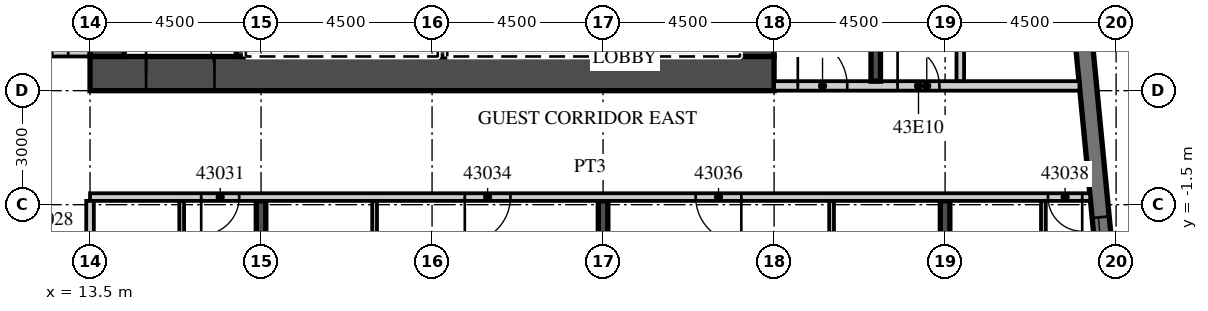
"""IFC4 building model, lengths in metres.
Left out: names, types, materials, properties, quantities, classifications, styles, units other than length and angle.
Written with IfcOpenShell. Run it as: python <this file> out.ifc"""

import sys

from ifc_helpers import new_model, si_unit, direction, frame, frame_2d, origin, place, context, subcontext, project, spatial, rectangle, extrude, element, fill, save


model = new_model("IFC4")
c1 = context("Model", 3, precision=1e-05, world=origin(), true_north=direction((0.0, 1.0)))
c2 = subcontext(c1, "Body", "Model", "MODEL_VIEW")
j1 = project(units=[si_unit("LENGTHUNIT", "METRE"), si_unit("PLANEANGLEUNIT", "RADIAN")], contexts=[c1])
p1 = place(None, origin())
s1 = spatial("IfcSite", under=j1, at=p1, CompositionType="ELEMENT")
p2 = place(p1, origin())
s2 = spatial("IfcBuilding", under=s1, at=p2, CompositionType="ELEMENT")
p3 = place(p2, frame((0.0, 0.0, 183.4)))
s3 = spatial("IfcBuildingStorey", under=s2, at=p3, CompositionType="ELEMENT", Elevation=183.4)
p4 = place(p3, frame((18.0, -19.245, 0.0), z_axis=(0.0, 0.0, 1.0), x_axis=(0.0, 1.0, 0.0)))
e1 = element("IfcWall", 1, at=p4, inside=s3, PredefinedType="SHEAR", context=c2, shape_type="SweptSolid", body=[
    extrude(rectangle(XDim=17.845, YDim=0.25, at=frame_2d((8.923, 0.0))), origin(), (0.0, 0.0, 1.0), 3.3),
])
p5 = place(p3, frame((27.0, -18.379, 0.0), z_axis=(0.0, 0.0, 1.0), x_axis=(0.0, 1.0, 0.0)))
e2 = element("IfcWall", 2, at=p5, inside=s3, PredefinedType="SHEAR", context=c2, shape_type="SweptSolid", body=[
    extrude(rectangle(XDim=16.979, YDim=0.25, at=frame_2d((8.489, 0.0))), origin(), (0.0, 0.0, 1.0), 3.3),
])
p6 = place(p3, frame((36.0, -17.512, 0.0), z_axis=(0.0, 0.0, 1.0), x_axis=(0.0, 1.0, 0.0)))
e3 = element("IfcWall", 3, at=p6, inside=s3, PredefinedType="SHEAR", context=c2, shape_type="SweptSolid", body=[
    extrude(rectangle(XDim=16.112, YDim=0.25, at=frame_2d((8.056, 0.0))), origin(), (0.0, 0.0, 1.0), 3.3),
])
p7 = place(p3, frame((41.214, -13.466, 0.0), z_axis=(0.0, 0.0, 1.0), x_axis=(-0.095847314626, 0.995396047952, 0.0)))
e4 = element("IfcWall", 4, at=p7, inside=s3, PredefinedType="SOLIDWALL", context=c2, shape_type="SweptSolid", body=[
    extrude(rectangle(XDim=34.0, YDim=0.45, at=frame_2d((17.0, 0.0))), origin(), (0.0, 0.0, 1.0), 3.02),
])
p8 = place(p7, frame((3.869, 0.0, 0.45)))
e5 = element("IfcOpeningElement", 5, at=p8, cuts=e4, PredefinedType="OPENING", context=c2, shape_type="SweptSolid", body=[
    extrude(rectangle(XDim=3.3, YDim=2.25, at=frame_2d((1.65, 1.125))), frame((0.0, 0.235, 0.0), z_axis=(0.0, -1.0, 0.0), x_axis=(1.0, 0.0, 0.0)), (0.0, 0.0, 1.0), 0.47),
])
p9 = place(p7, frame((8.39, 0.0, 0.45)))
e6 = element("IfcOpeningElement", 6, at=p9, cuts=e4, PredefinedType="OPENING", context=c2, shape_type="SweptSolid", body=[
    extrude(rectangle(XDim=3.3, YDim=2.25, at=frame_2d((1.65, 1.125))), frame((0.0, 0.235, 0.0), z_axis=(0.0, -1.0, 0.0), x_axis=(1.0, 0.0, 0.0)), (0.0, 0.0, 1.0), 0.47),
])
p10 = place(p3, frame((-13.5, 2.5, 0.0), z_axis=(0.0, 0.0, 1.0), x_axis=(1.0, 0.0, 0.0)))
e7 = element("IfcWall", 7, at=p10, inside=s3, PredefinedType="PARTITIONING", context=c2, shape_type="SweptSolid", body=[
    extrude(rectangle(XDim=27.0, YDim=0.2, at=frame_2d((13.5, 0.0))), origin(), (0.0, 0.0, 1.0), 3.02),
])
p11 = place(p10, frame((0.575, 0.0, 0.0)))
e8 = element("IfcOpeningElement", 8, at=p11, cuts=e7, PredefinedType="OPENING", context=c2, shape_type="SweptSolid", body=[
    extrude(rectangle(XDim=1.0, YDim=2.1, at=frame_2d((0.5, 1.05))), frame((0.0, 0.11, 0.0), z_axis=(0.0, -1.0, 0.0), x_axis=(1.0, 0.0, 0.0)), (0.0, 0.0, 1.0), 0.22),
])
p12 = place(p10, frame((9.863, 0.0, 0.0)))
e9 = element("IfcOpeningElement", 9, at=p12, cuts=e7, PredefinedType="OPENING", context=c2, shape_type="SweptSolid", body=[
    extrude(rectangle(XDim=1.2, YDim=2.1, at=frame_2d((0.6, 1.05))), frame((0.0, 0.11, 0.0), z_axis=(0.0, -1.0, 0.0), x_axis=(1.0, 0.0, 0.0)), (0.0, 0.0, 1.0), 0.22),
])
p13 = place(p10, frame((15.938, 0.0, 0.0)))
e10 = element("IfcOpeningElement", 10, at=p13, cuts=e7, PredefinedType="OPENING", context=c2, shape_type="SweptSolid", body=[
    extrude(rectangle(XDim=1.2, YDim=2.1, at=frame_2d((0.6, 1.05))), frame((0.0, 0.11, 0.0), z_axis=(0.0, -1.0, 0.0), x_axis=(1.0, 0.0, 0.0)), (0.0, 0.0, 1.0), 0.22),
])
p14 = place(p10, frame((25.425, 0.0, 0.0)))
e11 = element("IfcOpeningElement", 11, at=p14, cuts=e7, PredefinedType="OPENING", context=c2, shape_type="SweptSolid", body=[
    extrude(rectangle(XDim=1.0, YDim=2.1, at=frame_2d((0.5, 1.05))), frame((0.0, 0.11, 0.0), z_axis=(0.0, -1.0, 0.0), x_axis=(1.0, 0.0, 0.0)), (0.0, 0.0, 1.0), 0.22),
])
p15 = place(p3, frame((13.5, -1.3, 0.0), z_axis=(0.0, 0.0, 1.0), x_axis=(1.0, 0.0, 0.0)))
e12 = element("IfcWall", 12, at=p15, inside=s3, PredefinedType="PARTITIONING", context=c2, shape_type="SweptSolid", body=[
    extrude(rectangle(XDim=26.317, YDim=0.2, at=frame_2d((13.158, 0.0))), origin(), (0.0, 0.0, 1.0), 3.02),
])
p16 = place(p15, frame((2.925, 0.0, 0.0)))
e13 = element("IfcOpeningElement", 13, at=p16, cuts=e12, PredefinedType="OPENING", context=c2, shape_type="SweptSolid", body=[
    extrude(rectangle(XDim=1.0, YDim=2.1, at=frame_2d((0.5, 1.05))), frame((0.0, 0.11, 0.0), z_axis=(0.0, -1.0, 0.0), x_axis=(1.0, 0.0, 0.0)), (0.0, 0.0, 1.0), 0.22),
])
p17 = place(p15, frame((9.862, 0.0, 0.0)))
e14 = element("IfcOpeningElement", 14, at=p17, cuts=e12, PredefinedType="OPENING", context=c2, shape_type="SweptSolid", body=[
    extrude(rectangle(XDim=1.2, YDim=2.1, at=frame_2d((0.6, 1.05))), frame((0.0, 0.11, 0.0), z_axis=(0.0, -1.0, 0.0), x_axis=(1.0, 0.0, 0.0)), (0.0, 0.0, 1.0), 0.22),
])
p18 = place(p15, frame((15.938, 0.0, 0.0)))
e15 = element("IfcOpeningElement", 15, at=p18, cuts=e12, PredefinedType="OPENING", context=c2, shape_type="SweptSolid", body=[
    extrude(rectangle(XDim=1.2, YDim=2.1, at=frame_2d((0.6, 1.05))), frame((0.0, 0.11, 0.0), z_axis=(0.0, -1.0, 0.0), x_axis=(1.0, 0.0, 0.0)), (0.0, 0.0, 1.0), 0.22),
])
p19 = place(p15, frame((25.208, 0.0, 0.0)))
e16 = element("IfcOpeningElement", 16, at=p19, cuts=e12, PredefinedType="OPENING", context=c2, shape_type="SweptSolid", body=[
    extrude(rectangle(XDim=0.9, YDim=2.1, at=frame_2d((0.45, 1.05))), frame((0.0, 0.11, 0.0), z_axis=(0.0, -1.0, 0.0), x_axis=(1.0, 0.0, 0.0)), (0.0, 0.0, 1.0), 0.22),
])
p20 = place(p3, frame((13.5, -19.701, 0.0), z_axis=(0.0, 0.0, 1.0), x_axis=(0.0, 1.0, 0.0)))
e17 = element("IfcWall", 17, at=p20, inside=s3, PredefinedType="PARTITIONING", context=c2, shape_type="SweptSolid", body=[
    extrude(rectangle(XDim=18.301, YDim=0.2, at=frame_2d((9.15, 0.0))), origin(), (0.0, 0.0, 1.0), 3.02),
])
p21 = place(p3, frame((15.912, -6.625, 0.0), z_axis=(0.0, 0.0, 1.0), x_axis=(0.0, 1.0, 0.0)))
e18 = element("IfcWall", 18, at=p21, inside=s3, PredefinedType="PARTITIONING", context=c2, shape_type="SweptSolid", body=[
    extrude(rectangle(XDim=5.225, YDim=0.125, at=frame_2d((2.613, 0.0))), origin(), (0.0, 0.0, 1.0), 3.02),
])
p22 = place(p21, frame((1.875, 0.0, 0.0)))
e19 = element("IfcOpeningElement", 19, at=p22, cuts=e18, PredefinedType="OPENING", context=c2, shape_type="SweptSolid", body=[
    extrude(rectangle(XDim=0.9, YDim=2.1, at=frame_2d((0.45, 1.05))), frame((0.0, 0.073, 0.0), z_axis=(0.0, -1.0, 0.0), x_axis=(1.0, 0.0, 0.0)), (0.0, 0.0, 1.0), 0.145),
])
p23 = place(p3, frame((20.988, -6.625, 0.0), z_axis=(0.0, 0.0, 1.0), x_axis=(0.0, 1.0, 0.0)))
e20 = element("IfcWall", 20, at=p23, inside=s3, PredefinedType="PARTITIONING", context=c2, shape_type="SweptSolid", body=[
    extrude(rectangle(XDim=5.225, YDim=0.125, at=frame_2d((2.613, 0.0))), origin(), (0.0, 0.0, 1.0), 3.02),
])
p24 = place(p23, frame((1.875, 0.0, 0.0)))
e21 = element("IfcOpeningElement", 21, at=p24, cuts=e20, PredefinedType="OPENING", context=c2, shape_type="SweptSolid", body=[
    extrude(rectangle(XDim=0.9, YDim=2.1, at=frame_2d((0.45, 1.05))), frame((0.0, 0.073, 0.0), z_axis=(0.0, -1.0, 0.0), x_axis=(1.0, 0.0, 0.0)), (0.0, 0.0, 1.0), 0.145),
])
p25 = place(p3, frame((33.013, -6.625, 0.0), z_axis=(0.0, 0.0, 1.0), x_axis=(0.0, 1.0, 0.0)))
e22 = element("IfcWall", 22, at=p25, inside=s3, PredefinedType="PARTITIONING", context=c2, shape_type="SweptSolid", body=[
    extrude(rectangle(XDim=5.225, YDim=0.125, at=frame_2d((2.613, 0.0))), origin(), (0.0, 0.0, 1.0), 3.02),
])
p26 = place(p25, frame((1.875, 0.0, 0.0)))
e23 = element("IfcOpeningElement", 23, at=p26, cuts=e22, PredefinedType="OPENING", context=c2, shape_type="SweptSolid", body=[
    extrude(rectangle(XDim=0.9, YDim=2.1, at=frame_2d((0.45, 1.05))), frame((0.0, 0.073, 0.0), z_axis=(0.0, -1.0, 0.0), x_axis=(1.0, 0.0, 0.0)), (0.0, 0.0, 1.0), 0.145),
])
p27 = place(p3, frame((38.587, -6.445, 0.0), z_axis=(0.0, 0.0, 1.0), x_axis=(0.0, 1.0, 0.0)))
e24 = element("IfcWall", 24, at=p27, inside=s3, PredefinedType="PARTITIONING", context=c2, shape_type="SweptSolid", body=[
    extrude(rectangle(XDim=5.045, YDim=0.125, at=frame_2d((2.522, 0.0))), origin(), (0.0, 0.0, 1.0), 3.02),
])
p28 = place(p27, frame((1.695, 0.0, 0.0)))
e25 = element("IfcOpeningElement", 25, at=p28, cuts=e24, PredefinedType="OPENING", context=c2, shape_type="SweptSolid", body=[
    extrude(rectangle(XDim=0.9, YDim=2.1, at=frame_2d((0.45, 1.05))), frame((0.0, 0.073, 0.0), z_axis=(0.0, -1.0, 0.0), x_axis=(1.0, 0.0, 0.0)), (0.0, 0.0, 1.0), 0.145),
])
p29 = place(p3, frame((13.5, 1.95, 0.0), z_axis=(0.0, 0.0, 1.0), x_axis=(1.0, 0.0, 0.0)))
e26 = element("IfcWall", 26, at=p29, inside=s3, PredefinedType="SHEAR", context=c2, shape_type="SweptSolid", body=[
    extrude(rectangle(XDim=18.0, YDim=0.9, at=frame_2d((9.0, 0.0))), origin(), (0.0, 0.0, 1.0), 3.02),
])
p30 = place(p29, frame((1.475, 0.0, 0.0)))
e27 = element("IfcOpeningElement", 27, at=p30, cuts=e26, PredefinedType="OPENING", context=c2, shape_type="SweptSolid", body=[
    extrude(rectangle(XDim=1.8, YDim=2.1, at=frame_2d((0.9, 1.05))), frame((0.0, 0.46, 0.0), z_axis=(0.0, -1.0, 0.0), x_axis=(1.0, 0.0, 0.0)), (0.0, 0.0, 1.0), 0.92),
])
p31 = place(p3, frame((31.05, 2.4, 0.0), z_axis=(0.0, 0.0, 1.0), x_axis=(0.0, 1.0, 0.0)))
e28 = element("IfcWall", 28, at=p31, inside=s3, PredefinedType="SHEAR", context=c2, shape_type="SweptSolid", body=[
    extrude(rectangle(XDim=12.8, YDim=0.9, at=frame_2d((6.4, 0.0))), origin(), (0.0, 0.0, 1.0), 3.02),
])
p32 = place(p31, frame((0.2, 0.0, 0.0)))
e29 = element("IfcOpeningElement", 29, at=p32, cuts=e28, PredefinedType="OPENING", context=c2, shape_type="SweptSolid", body=[
    extrude(rectangle(XDim=1.1, YDim=2.1, at=frame_2d((0.55, 1.05))), frame((0.0, 0.46, 0.0), z_axis=(0.0, -1.0, 0.0), x_axis=(1.0, 0.0, 0.0)), (0.0, 0.0, 1.0), 0.92),
])
p33 = place(p3, frame((13.95, 2.4, 0.0), z_axis=(0.0, 0.0, 1.0), x_axis=(0.0, 1.0, 0.0)))
e30 = element("IfcWall", 30, at=p33, inside=s3, PredefinedType="SHEAR", context=c2, shape_type="SweptSolid", body=[
    extrude(rectangle(XDim=12.2, YDim=0.9, at=frame_2d((6.1, 0.0))), origin(), (0.0, 0.0, 1.0), 3.02),
])
p34 = place(p3, frame((17.475, 2.4, 0.0), z_axis=(0.0, 0.0, 1.0), x_axis=(0.0, 1.0, 0.0)))
e31 = element("IfcWall", 31, at=p34, inside=s3, PredefinedType="SHEAR", context=c2, shape_type="SweptSolid", body=[
    extrude(rectangle(XDim=3.15, YDim=0.25, at=frame_2d((1.575, 0.0))), origin(), (0.0, 0.0, 1.0), 3.02),
])
for number, where, z_axis, x_axis in (
    (32, (27.975, 2.4, 0.0), (0.0, 0.0, 1.0), (0.0, 1.0, 0.0)),
    (33, (22.775, 2.4, 0.0), (0.0, 0.0, 1.0), (0.0, 1.0, 0.0)),
):
    element("IfcWall", number, at=place(p3, frame(where, z_axis=z_axis, x_axis=x_axis)), inside=s3, PredefinedType="SHEAR", context=c2, shape_type="SweptSolid", body=[
        extrude(rectangle(XDim=2.9, YDim=0.25, at=frame_2d((1.45, 0.0))), origin(), (0.0, 0.0, 1.0), 3.02),
    ])
p35 = place(p3, frame((31.5, 1.625, 0.0), z_axis=(0.0, 0.0, 1.0), x_axis=(1.0, 0.0, 0.0)))
e34 = element("IfcWall", 34, at=p35, inside=s3, PredefinedType="PARTITIONING", context=c2, shape_type="SweptSolid", body=[
    extrude(rectangle(XDim=8.035, YDim=0.25, at=frame_2d((4.018, 0.0))), origin(), (0.0, 0.0, 1.0), 3.02),
])
p36 = place(p35, frame((0.625, 0.0, 0.0)))
e35 = element("IfcOpeningElement", 35, at=p36, cuts=e34, PredefinedType="OPENING", context=c2, shape_type="SweptSolid", body=[
    extrude(rectangle(XDim=1.3, YDim=2.1, at=frame_2d((0.65, 1.05))), frame((0.0, 0.135, 0.0), z_axis=(0.0, -1.0, 0.0), x_axis=(1.0, 0.0, 0.0)), (0.0, 0.0, 1.0), 0.27),
])
p37 = place(p35, frame((3.25, 0.0, 0.0)))
e36 = element("IfcOpeningElement", 36, at=p37, cuts=e34, PredefinedType="OPENING", context=c2, shape_type="SweptSolid", body=[
    extrude(rectangle(XDim=1.1, YDim=2.1, at=frame_2d((0.55, 1.05))), frame((0.0, 0.135, 0.0), z_axis=(0.0, -1.0, 0.0), x_axis=(1.0, 0.0, 0.0)), (0.0, 0.0, 1.0), 0.27),
])
p38 = place(p3, frame((34.175, 1.75, 0.0), z_axis=(0.0, 0.0, 1.0), x_axis=(0.0, 1.0, 0.0)))
e37 = element("IfcWall", 37, at=p38, inside=s3, PredefinedType="SHEAR", context=c2, shape_type="SweptSolid", body=[
    extrude(rectangle(XDim=8.35, YDim=0.25, at=frame_2d((4.175, 0.0))), origin(), (0.0, 0.0, 1.0), 3.02),
])
p39 = place(p3, frame((36.4, 1.75, 0.0), z_axis=(0.0, 0.0, 1.0), x_axis=(0.0, 1.0, 0.0)))
e38 = element("IfcWall", 38, at=p39, inside=s3, PredefinedType="PARTITIONING", context=c2, shape_type="SweptSolid", body=[
    extrude(rectangle(XDim=15.95, YDim=0.2, at=frame_2d((7.975, 0.0))), origin(), (0.0, 0.0, 1.0), 3.02),
])
p40 = place(p39, frame((14.7, 0.0, 0.0)))
e39 = element("IfcOpeningElement", 39, at=p40, cuts=e38, PredefinedType="OPENING", context=c2, shape_type="SweptSolid", body=[
    extrude(rectangle(XDim=0.9, YDim=2.1, at=frame_2d((0.45, 1.05))), frame((0.0, 0.11, 0.0), z_axis=(0.0, -1.0, 0.0), x_axis=(1.0, 0.0, 0.0)), (0.0, 0.0, 1.0), 0.22),
])
p41 = place(p9, origin())
e40 = element("IfcWindow", 40, at=p41, inside=s3, PartitioningType="SINGLE_PANEL", PredefinedType="WINDOW", context=c2, shape_type="SweptSolid", body=[
    extrude(rectangle(XDim=3.3, YDim=2.25, at=frame_2d((1.65, 1.125))), frame((0.0, 0.09, 0.0), z_axis=(0.0, -1.0, 0.0), x_axis=(1.0, 0.0, 0.0)), (0.0, 0.0, 1.0), 0.06),
])
fill(e6, e40)
p42 = place(p14, origin())
e41 = element("IfcDoor", 41, at=p42, inside=s3, OperationType="SINGLE_SWING_RIGHT", PredefinedType="DOOR", context=c2, shape_type="SweptSolid", body=[
    extrude(rectangle(XDim=1.0, YDim=2.1, at=frame_2d((0.5, 1.05))), frame((0.0, 0.025, 0.0), z_axis=(0.0, -1.0, 0.0), x_axis=(1.0, 0.0, 0.0)), (0.0, 0.0, 1.0), 0.05),
])
fill(e11, e41)
p43 = place(p16, origin())
e42 = element("IfcDoor", 42, at=p43, inside=s3, OperationType="SINGLE_SWING_LEFT", PredefinedType="DOOR", context=c2, shape_type="SweptSolid", body=[
    extrude(rectangle(XDim=1.0, YDim=2.1, at=frame_2d((0.5, 1.05))), frame((0.0, 0.025, 0.0), z_axis=(0.0, -1.0, 0.0), x_axis=(1.0, 0.0, 0.0)), (0.0, 0.0, 1.0), 0.05),
])
fill(e13, e42)
p44 = place(p17, origin())
e43 = element("IfcDoor", 43, at=p44, inside=s3, OperationType="SINGLE_SWING_LEFT", PredefinedType="DOOR", context=c2, shape_type="SweptSolid", body=[
    extrude(rectangle(XDim=1.2, YDim=2.1, at=frame_2d((0.6, 1.05))), frame((0.0, 0.025, 0.0), z_axis=(0.0, -1.0, 0.0), x_axis=(1.0, 0.0, 0.0)), (0.0, 0.0, 1.0), 0.05),
])
fill(e14, e43)
p45 = place(p18, origin())
e44 = element("IfcDoor", 44, at=p45, inside=s3, OperationType="SINGLE_SWING_RIGHT", PredefinedType="DOOR", context=c2, shape_type="SweptSolid", body=[
    extrude(rectangle(XDim=1.2, YDim=2.1, at=frame_2d((0.6, 1.05))), frame((0.0, 0.025, 0.0), z_axis=(0.0, -1.0, 0.0), x_axis=(1.0, 0.0, 0.0)), (0.0, 0.0, 1.0), 0.05),
])
fill(e15, e44)
p46 = place(p19, origin())
e45 = element("IfcDoor", 45, at=p46, inside=s3, OperationType="SINGLE_SWING_RIGHT", PredefinedType="DOOR", context=c2, shape_type="SweptSolid", body=[
    extrude(rectangle(XDim=0.9, YDim=2.1, at=frame_2d((0.45, 1.05))), frame((0.0, 0.025, 0.0), z_axis=(0.0, -1.0, 0.0), x_axis=(1.0, 0.0, 0.0)), (0.0, 0.0, 1.0), 0.05),
])
fill(e16, e45)
p47 = place(p30, origin())
e46 = element("IfcDoor", 46, at=p47, inside=s3, OperationType="DOUBLE_DOOR_DOUBLE_SWING", PredefinedType="DOOR", context=c2, shape_type="SweptSolid", body=[
    extrude(rectangle(XDim=1.8, YDim=2.1, at=frame_2d((0.9, 1.05))), frame((0.0, 0.025, 0.0), z_axis=(0.0, -1.0, 0.0), x_axis=(1.0, 0.0, 0.0)), (0.0, 0.0, 1.0), 0.05),
])
fill(e27, e46)
p48 = place(p36, origin())
e47 = element("IfcDoor", 47, at=p48, inside=s3, OperationType="SINGLE_SWING_LEFT", PredefinedType="DOOR", context=c2, shape_type="SweptSolid", body=[
    extrude(rectangle(XDim=1.3, YDim=2.1, at=frame_2d((0.65, 1.05))), frame((0.0, 0.025, 0.0), z_axis=(0.0, -1.0, 0.0), x_axis=(1.0, 0.0, 0.0)), (0.0, 0.0, 1.0), 0.05),
])
fill(e35, e47)
p49 = place(p37, origin())
e48 = element("IfcDoor", 48, at=p49, inside=s3, OperationType="SINGLE_SWING_LEFT", PredefinedType="DOOR", context=c2, shape_type="SweptSolid", body=[
    extrude(rectangle(XDim=1.1, YDim=2.1, at=frame_2d((0.55, 1.05))), frame((0.0, 0.025, 0.0), z_axis=(0.0, -1.0, 0.0), x_axis=(1.0, 0.0, 0.0)), (0.0, 0.0, 1.0), 0.05),
])
fill(e36, e48)
save(model, sys.argv[1])
